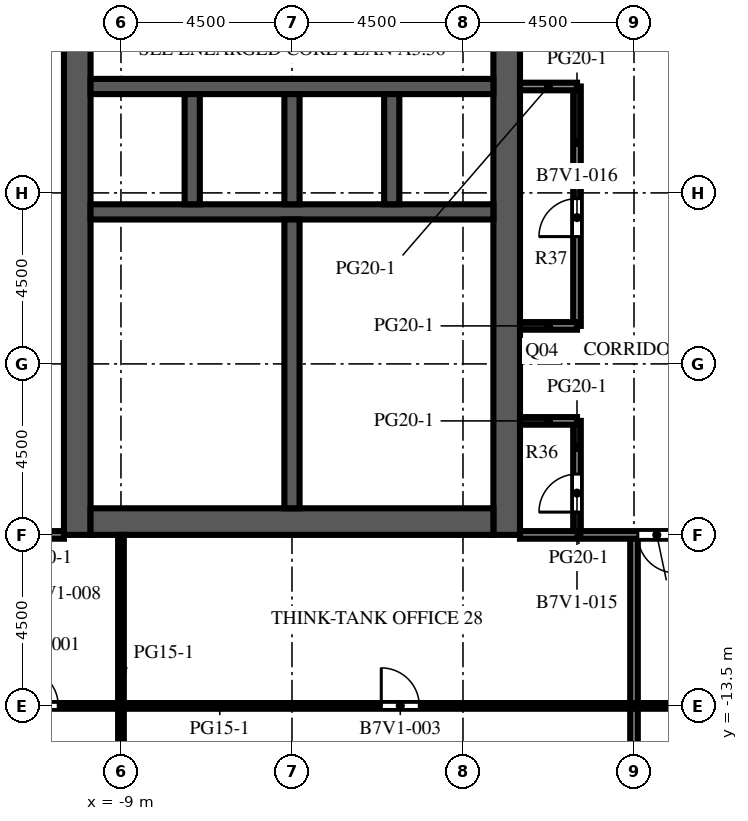
"""IFC4 building model, lengths in metres.
Left out: names, types, materials, properties, quantities, classifications, styles, units other than length and angle.
Written with IfcOpenShell. Run it as: python <this file> out.ifc"""

import sys

from ifc_helpers import new_model, si_unit, direction, frame, frame_2d, origin, place, context, subcontext, project, spatial, rectangle, extrude, element, fill, save


model = new_model("IFC4")
c1 = context("Model", 3, precision=1e-05, world=origin(), true_north=direction((0.0, 1.0)))
c2 = subcontext(c1, "Body", "Model", "MODEL_VIEW")
j1 = project(units=[si_unit("LENGTHUNIT", "METRE"), si_unit("PLANEANGLEUNIT", "RADIAN")], contexts=[c1])
p1 = place(None, origin())
s1 = spatial("IfcSite", under=j1, at=p1, CompositionType="ELEMENT")
p2 = place(p1, origin())
s2 = spatial("IfcBuilding", under=s1, at=p2, CompositionType="ELEMENT")
p3 = place(p2, frame((0.0, 0.0, 248.0)))
s3 = spatial("IfcBuildingStorey", under=s2, at=p3, CompositionType="ELEMENT", Elevation=248.0)
p4 = place(p3, frame((-10.15, -9.0, 0.0), z_axis=(0.0, 0.0, 1.0), x_axis=(0.0, 1.0, 0.0)))
e1 = element("IfcWall", 1, at=p4, inside=s3, PredefinedType="SHEAR", context=c2, shape_type="SweptSolid", body=[
    extrude(rectangle(XDim=27.5, YDim=0.7, at=frame_2d((13.75, 0.0))), origin(), (0.0, 0.0, 1.0), 4.1),
])
p5 = place(p4, frame((12.55, 0.0, 0.0)))
e2 = element("IfcOpeningElement", 2, at=p5, cuts=e1, PredefinedType="OPENING", context=c2, shape_type="SweptSolid", body=[
    extrude(rectangle(XDim=2.4, YDim=2.4, at=frame_2d((1.2, 1.2))), frame((0.0, 0.36, 0.0), z_axis=(0.0, -1.0, 0.0), x_axis=(1.0, 0.0, 0.0)), (0.0, 0.0, 1.0), 0.72),
])
p6 = place(p4, frame((6.825, 0.0, 0.0)))
e3 = element("IfcOpeningElement", 3, at=p6, cuts=e1, PredefinedType="OPENING", context=c2, shape_type="SweptSolid", body=[
    extrude(rectangle(XDim=1.2, YDim=2.1, at=frame_2d((0.6, 1.05))), frame((0.0, 0.36, 0.0), z_axis=(0.0, -1.0, 0.0), x_axis=(1.0, 0.0, 0.0)), (0.0, 0.0, 1.0), 0.72),
])
p7 = place(p4, frame((19.475, 0.0, 0.0)))
e4 = element("IfcOpeningElement", 4, at=p7, cuts=e1, PredefinedType="OPENING", context=c2, shape_type="SweptSolid", body=[
    extrude(rectangle(XDim=1.2, YDim=2.1, at=frame_2d((0.6, 1.05))), frame((0.0, 0.36, 0.0), z_axis=(0.0, -1.0, 0.0), x_axis=(1.0, 0.0, 0.0)), (0.0, 0.0, 1.0), 0.72),
])
p8 = place(p3, frame((1.15, -9.0, 0.0), z_axis=(0.0, 0.0, 1.0), x_axis=(0.0, 1.0, 0.0)))
e5 = element("IfcWall", 5, at=p8, inside=s3, PredefinedType="SHEAR", context=c2, shape_type="SweptSolid", body=[
    extrude(rectangle(XDim=27.5, YDim=0.7, at=frame_2d((13.75, 0.0))), origin(), (0.0, 0.0, 1.0), 4.1),
])
p9 = place(p8, frame((12.55, 0.0, 0.0)))
e6 = element("IfcOpeningElement", 6, at=p9, cuts=e5, PredefinedType="OPENING", context=c2, shape_type="SweptSolid", body=[
    extrude(rectangle(XDim=2.4, YDim=2.4, at=frame_2d((1.2, 1.2))), frame((0.0, 0.36, 0.0), z_axis=(0.0, -1.0, 0.0), x_axis=(1.0, 0.0, 0.0)), (0.0, 0.0, 1.0), 0.72),
])
p10 = place(p8, frame((3.9, 0.0, 0.0)))
e7 = element("IfcOpeningElement", 7, at=p10, cuts=e5, PredefinedType="OPENING", context=c2, shape_type="SweptSolid", body=[
    extrude(rectangle(XDim=1.2, YDim=2.1, at=frame_2d((0.6, 1.05))), frame((0.0, 0.36, 0.0), z_axis=(0.0, -1.0, 0.0), x_axis=(1.0, 0.0, 0.0)), (0.0, 0.0, 1.0), 0.72),
])
p11 = place(p8, frame((22.4, 0.0, 0.0)))
e8 = element("IfcOpeningElement", 8, at=p11, cuts=e5, PredefinedType="OPENING", context=c2, shape_type="SweptSolid", body=[
    extrude(rectangle(XDim=1.2, YDim=2.1, at=frame_2d((0.6, 1.05))), frame((0.0, 0.36, 0.0), z_axis=(0.0, -1.0, 0.0), x_axis=(1.0, 0.0, 0.0)), (0.0, 0.0, 1.0), 0.72),
])
p12 = place(p3, frame((-9.8, -8.65, 0.0), z_axis=(0.0, 0.0, 1.0), x_axis=(1.0, 0.0, 0.0)))
e9 = element("IfcWall", 9, at=p12, inside=s3, PredefinedType="SHEAR", context=c2, shape_type="SweptSolid", body=[
    extrude(rectangle(XDim=10.6, YDim=0.7, at=frame_2d((5.3, 0.0))), origin(), (0.0, 0.0, 1.0), 4.1),
])
p13 = place(p3, frame((-9.8, -0.5, 0.0), z_axis=(0.0, 0.0, 1.0), x_axis=(1.0, 0.0, 0.0)))
e10 = element("IfcWall", 10, at=p13, inside=s3, PredefinedType="SHEAR", context=c2, shape_type="SweptSolid", body=[
    extrude(rectangle(XDim=10.6, YDim=0.4, at=frame_2d((5.3, 0.0))), origin(), (0.0, 0.0, 1.0), 4.1),
])
p14 = place(p3, frame((-9.8, 2.8, 0.0), z_axis=(0.0, 0.0, 1.0), x_axis=(1.0, 0.0, 0.0)))
e11 = element("IfcWall", 11, at=p14, inside=s3, PredefinedType="SHEAR", context=c2, shape_type="SweptSolid", body=[
    extrude(rectangle(XDim=10.6, YDim=0.4, at=frame_2d((5.3, 0.0))), origin(), (0.0, 0.0, 1.0), 4.1),
])
p15 = place(p14, frame((0.688, 0.0, 0.0)))
e12 = element("IfcOpeningElement", 12, at=p15, cuts=e11, PredefinedType="OPENING", context=c2, shape_type="SweptSolid", body=[
    extrude(rectangle(XDim=1.1, YDim=2.1, at=frame_2d((0.55, 1.05))), frame((0.0, 0.21, 0.0), z_axis=(0.0, -1.0, 0.0), x_axis=(1.0, 0.0, 0.0)), (0.0, 0.0, 1.0), 0.42),
])
p16 = place(p14, frame((3.438, 0.0, 0.0)))
e13 = element("IfcOpeningElement", 13, at=p16, cuts=e11, PredefinedType="OPENING", context=c2, shape_type="SweptSolid", body=[
    extrude(rectangle(XDim=1.1, YDim=2.1, at=frame_2d((0.55, 1.05))), frame((0.0, 0.21, 0.0), z_axis=(0.0, -1.0, 0.0), x_axis=(1.0, 0.0, 0.0)), (0.0, 0.0, 1.0), 0.42),
])
p17 = place(p14, frame((6.113, 0.0, 0.0)))
e14 = element("IfcOpeningElement", 14, at=p17, cuts=e11, PredefinedType="OPENING", context=c2, shape_type="SweptSolid", body=[
    extrude(rectangle(XDim=1.0, YDim=2.1, at=frame_2d((0.5, 1.05))), frame((0.0, 0.21, 0.0), z_axis=(0.0, -1.0, 0.0), x_axis=(1.0, 0.0, 0.0)), (0.0, 0.0, 1.0), 0.42),
])
p18 = place(p14, frame((8.863, 0.0, 0.0)))
e15 = element("IfcOpeningElement", 15, at=p18, cuts=e11, PredefinedType="OPENING", context=c2, shape_type="SweptSolid", body=[
    extrude(rectangle(XDim=1.0, YDim=2.1, at=frame_2d((0.5, 1.05))), frame((0.0, 0.21, 0.0), z_axis=(0.0, -1.0, 0.0), x_axis=(1.0, 0.0, 0.0)), (0.0, 0.0, 1.0), 0.42),
])
for number, where, z_axis, x_axis in (
    (16, (-7.125, -0.3, 0.0), (0.0, 0.0, 1.0), (0.0, 1.0, 0.0)),
    (17, (-4.5, -0.3, 0.0), (0.0, 0.0, 1.0), (0.0, 1.0, 0.0)),
    (18, (-1.875, -0.3, 0.0), (0.0, 0.0, 1.0), (0.0, 1.0, 0.0)),
):
    element("IfcWall", number, at=place(p3, frame(where, z_axis=z_axis, x_axis=x_axis)), inside=s3, PredefinedType="SHEAR", context=c2, shape_type="SweptSolid", body=[
        extrude(rectangle(XDim=2.9, YDim=0.4, at=frame_2d((1.45, 0.0))), origin(), (0.0, 0.0, 1.0), 4.1),
    ])
p19 = place(p3, frame((-4.5, -8.3, 0.0), z_axis=(0.0, 0.0, 1.0), x_axis=(0.0, 1.0, 0.0)))
e19 = element("IfcWall", 19, at=p19, inside=s3, PredefinedType="SHEAR", context=c2, shape_type="SweptSolid", body=[
    extrude(rectangle(XDim=7.6, YDim=0.4, at=frame_2d((3.8, 0.0))), origin(), (0.0, 0.0, 1.0), 4.1),
])
p20 = place(p3, frame((-0.7, -8.3, 0.0), z_axis=(0.0, 0.0, 1.0), x_axis=(0.0, 1.0, 0.0)))
e20 = element("IfcWall", 20, at=p20, inside=s3, PredefinedType="PARTITIONING", context=c2, shape_type="SweptSolid", body=[
    extrude(rectangle(XDim=2.584, YDim=0.1, at=frame_2d((1.292, 0.0))), origin(), (0.0, 0.0, 1.0), 3.65),
])
p21 = place(p20, frame((0.792, 0.0, 0.0)))
e21 = element("IfcOpeningElement", 21, at=p21, cuts=e20, PredefinedType="OPENING", context=c2, shape_type="SweptSolid", body=[
    extrude(rectangle(XDim=1.0, YDim=2.1, at=frame_2d((0.5, 1.05))), frame((0.0, 0.06, 0.0), z_axis=(0.0, -1.0, 0.0), x_axis=(1.0, 0.0, 0.0)), (0.0, 0.0, 1.0), 0.12),
])
p22 = place(p3, frame((-0.7, -5.716, 0.0), z_axis=(0.0, 0.0, 1.0), x_axis=(0.0, 1.0, 0.0)))
e22 = element("IfcWall", 22, at=p22, inside=s3, PredefinedType="PARTITIONING", context=c2, shape_type="SweptSolid", body=[
    extrude(rectangle(XDim=2.128, YDim=0.1, at=frame_2d((1.064, 0.0))), origin(), (0.0, 0.0, 1.0), 3.65),
])
p23 = place(p22, frame((0.564, 0.0, 0.0)))
e23 = element("IfcOpeningElement", 23, at=p23, cuts=e22, PredefinedType="OPENING", context=c2, shape_type="SweptSolid", body=[
    extrude(rectangle(XDim=1.0, YDim=2.1, at=frame_2d((0.5, 1.05))), frame((0.0, 0.06, 0.0), z_axis=(0.0, -1.0, 0.0), x_axis=(1.0, 0.0, 0.0)), (0.0, 0.0, 1.0), 0.12),
])
p24 = place(p3, frame((-0.7, -3.588, 0.0), z_axis=(0.0, 0.0, 1.0), x_axis=(0.0, 1.0, 0.0)))
e24 = element("IfcWall", 24, at=p24, inside=s3, PredefinedType="PARTITIONING", context=c2, shape_type="SweptSolid", body=[
    extrude(rectangle(XDim=2.888, YDim=0.1, at=frame_2d((1.444, 0.0))), origin(), (0.0, 0.0, 1.0), 3.65),
])
p25 = place(p24, frame((0.944, 0.0, 0.0)))
e25 = element("IfcOpeningElement", 25, at=p25, cuts=e24, PredefinedType="OPENING", context=c2, shape_type="SweptSolid", body=[
    extrude(rectangle(XDim=1.0, YDim=2.1, at=frame_2d((0.5, 1.05))), frame((0.0, 0.06, 0.0), z_axis=(0.0, -1.0, 0.0), x_axis=(1.0, 0.0, 0.0)), (0.0, 0.0, 1.0), 0.12),
])
for number, where, z_axis, x_axis in (
    (26, (-4.3, -5.716, 0.0), (0.0, 0.0, 1.0), (1.0, 0.0, 0.0)),
    (27, (-4.3, -3.588, 0.0), (0.0, 0.0, 1.0), (1.0, 0.0, 0.0)),
):
    element("IfcWall", number, at=place(p3, frame(where, z_axis=z_axis, x_axis=x_axis)), inside=s3, PredefinedType="PARTITIONING", context=c2, shape_type="SweptSolid", body=[
        extrude(rectangle(XDim=3.6, YDim=0.1, at=frame_2d((1.8, 0.0))), origin(), (0.0, 0.0, 1.0), 3.65),
    ])
p26 = place(p3, frame((-9.0, -17.5, 0.0), z_axis=(0.0, 0.0, 1.0), x_axis=(0.0, 1.0, 0.0)))
e28 = element("IfcWall", 28, at=p26, inside=s3, PredefinedType="PARTITIONING", context=c2, shape_type="SweptSolid", body=[
    extrude(rectangle(XDim=8.5, YDim=0.15, at=frame_2d((4.25, 0.0))), origin(), (0.0, 0.0, 1.0), 3.65),
])
p27 = place(p3, frame((3.0, -9.0, 0.0), z_axis=(0.0, 0.0, 1.0), x_axis=(0.0, 1.0, 0.0)))
e29 = element("IfcWall", 29, at=p27, inside=s3, PredefinedType="PARTITIONING", context=c2, shape_type="SweptSolid", body=[
    extrude(rectangle(XDim=3.0, YDim=0.2, at=frame_2d((1.5, 0.0))), origin(), (0.0, 0.0, 1.0), 3.65),
])
p28 = place(p27, frame((0.6, 0.0, 0.0)))
e30 = element("IfcOpeningElement", 30, at=p28, cuts=e29, PredefinedType="OPENING", context=c2, shape_type="SweptSolid", body=[
    extrude(rectangle(XDim=1.0, YDim=2.1, at=frame_2d((0.5, 1.05))), frame((0.0, 0.11, 0.0), z_axis=(0.0, -1.0, 0.0), x_axis=(1.0, 0.0, 0.0)), (0.0, 0.0, 1.0), 0.22),
])
p29 = place(p3, frame((3.0, -3.5, 0.0), z_axis=(0.0, 0.0, 1.0), x_axis=(0.0, 1.0, 0.0)))
e31 = element("IfcWall", 31, at=p29, inside=s3, PredefinedType="PARTITIONING", context=c2, shape_type="SweptSolid", body=[
    extrude(rectangle(XDim=6.3, YDim=0.2, at=frame_2d((3.15, 0.0))), origin(), (0.0, 0.0, 1.0), 3.65),
])
p30 = place(p29, frame((2.35, 0.0, 0.0)))
e32 = element("IfcOpeningElement", 32, at=p30, cuts=e31, PredefinedType="OPENING", context=c2, shape_type="SweptSolid", body=[
    extrude(rectangle(XDim=1.0, YDim=2.1, at=frame_2d((0.5, 1.05))), frame((0.0, 0.11, 0.0), z_axis=(0.0, -1.0, 0.0), x_axis=(1.0, 0.0, 0.0)), (0.0, 0.0, 1.0), 0.22),
])
p31 = place(p3, frame((4.5, -22.1, 0.0), z_axis=(0.0, 0.0, 1.0), x_axis=(0.0, 1.0, 0.0)))
e33 = element("IfcWall", 33, at=p31, inside=s3, PredefinedType="PARTITIONING", context=c2, shape_type="SweptSolid", body=[
    extrude(rectangle(XDim=13.1, YDim=0.2, at=frame_2d((6.55, 0.0))), origin(), (0.0, 0.0, 1.0), 3.65),
])
p32 = place(p3, frame((21.0, -13.5, 0.0), z_axis=(0.0, 0.0, 1.0), x_axis=(-1.0, 0.0, 0.0)))
e34 = element("IfcWall", 34, at=p32, inside=s3, PredefinedType="PARTITIONING", context=c2, shape_type="SweptSolid", body=[
    extrude(rectangle(XDim=34.5, YDim=0.15, at=frame_2d((17.25, 0.0))), origin(), (0.0, 0.0, 1.0), 3.65),
])
p33 = place(p32, frame((31.65, 0.0, 0.0)))
e35 = element("IfcOpeningElement", 35, at=p33, cuts=e34, PredefinedType="OPENING", context=c2, shape_type="SweptSolid", body=[
    extrude(rectangle(XDim=1.0, YDim=2.1, at=frame_2d((0.5, 1.05))), frame((0.0, 0.085, 0.0), z_axis=(0.0, -1.0, 0.0), x_axis=(1.0, 0.0, 0.0)), (0.0, 0.0, 1.0), 0.17),
])
p34 = place(p32, frame((22.15, 0.0, 0.0)))
e36 = element("IfcOpeningElement", 36, at=p34, cuts=e34, PredefinedType="OPENING", context=c2, shape_type="SweptSolid", body=[
    extrude(rectangle(XDim=1.0, YDim=2.1, at=frame_2d((0.5, 1.05))), frame((0.0, 0.085, 0.0), z_axis=(0.0, -1.0, 0.0), x_axis=(1.0, 0.0, 0.0)), (0.0, 0.0, 1.0), 0.17),
])
p35 = place(p32, frame((13.15, 0.0, 0.0)))
e37 = element("IfcOpeningElement", 37, at=p35, cuts=e34, PredefinedType="OPENING", context=c2, shape_type="SweptSolid", body=[
    extrude(rectangle(XDim=1.0, YDim=2.1, at=frame_2d((0.5, 1.05))), frame((0.0, 0.085, 0.0), z_axis=(0.0, -1.0, 0.0), x_axis=(1.0, 0.0, 0.0)), (0.0, 0.0, 1.0), 0.17),
])
p36 = place(p32, frame((6.15, 0.0, 0.0)))
e38 = element("IfcOpeningElement", 38, at=p36, cuts=e34, PredefinedType="OPENING", context=c2, shape_type="SweptSolid", body=[
    extrude(rectangle(XDim=1.0, YDim=2.1, at=frame_2d((0.5, 1.05))), frame((0.0, 0.085, 0.0), z_axis=(0.0, -1.0, 0.0), x_axis=(1.0, 0.0, 0.0)), (0.0, 0.0, 1.0), 0.17),
])
p37 = place(p3, frame((-10.5, -9.0, 0.0), z_axis=(0.0, 0.0, 1.0), x_axis=(-1.0, 0.0, 0.0)))
e39 = element("IfcWall", 39, at=p37, inside=s3, PredefinedType="PARTITIONING", context=c2, shape_type="SweptSolid", body=[
    extrude(rectangle(XDim=3.0, YDim=0.2, at=frame_2d((1.5, 0.0))), origin(), (0.0, 0.0, 1.0), 3.65),
])
p38 = place(p37, frame((1.15, 0.0, 0.0)))
e40 = element("IfcOpeningElement", 40, at=p38, cuts=e39, PredefinedType="OPENING", context=c2, shape_type="SweptSolid", body=[
    extrude(rectangle(XDim=1.0, YDim=2.1, at=frame_2d((0.5, 1.05))), frame((0.0, 0.11, 0.0), z_axis=(0.0, -1.0, 0.0), x_axis=(1.0, 0.0, 0.0)), (0.0, 0.0, 1.0), 0.22),
])
p39 = place(p3, frame((6.0, -9.0, 0.0), z_axis=(0.0, 0.0, 1.0), x_axis=(-1.0, 0.0, 0.0)))
e41 = element("IfcWall", 41, at=p39, inside=s3, PredefinedType="PARTITIONING", context=c2, shape_type="SweptSolid", body=[
    extrude(rectangle(XDim=4.5, YDim=0.2, at=frame_2d((2.25, 0.0))), origin(), (0.0, 0.0, 1.0), 3.65),
])
p40 = place(p39, frame((0.4, 0.0, 0.0)))
e42 = element("IfcOpeningElement", 42, at=p40, cuts=e41, PredefinedType="OPENING", context=c2, shape_type="SweptSolid", body=[
    extrude(rectangle(XDim=1.0, YDim=2.1, at=frame_2d((0.5, 1.05))), frame((0.0, 0.11, 0.0), z_axis=(0.0, -1.0, 0.0), x_axis=(1.0, 0.0, 0.0)), (0.0, 0.0, 1.0), 0.22),
])
for number, where, z_axis, x_axis in (
    (43, (1.5, -6.0, 0.0), (0.0, 0.0, 1.0), (1.0, 0.0, 0.0)),
    (44, (1.5, -3.5, 0.0), (0.0, 0.0, 1.0), (1.0, 0.0, 0.0)),
    (45, (1.5, 2.8, 0.0), (0.0, 0.0, 1.0), (1.0, 0.0, 0.0)),
):
    element("IfcWall", number, at=place(p3, frame(where, z_axis=z_axis, x_axis=x_axis)), inside=s3, PredefinedType="PARTITIONING", context=c2, shape_type="SweptSolid", body=[
        extrude(rectangle(XDim=1.5, YDim=0.2, at=frame_2d((0.75, 0.0))), origin(), (0.0, 0.0, 1.0), 3.65),
    ])
p41 = place(p15, origin())
e46 = element("IfcDoor", 46, at=p41, inside=s3, OperationType="DOUBLE_DOOR_SLIDING", PredefinedType="DOOR", context=c2, shape_type="SweptSolid", body=[
    extrude(rectangle(XDim=1.1, YDim=2.1, at=frame_2d((0.55, 1.05))), frame((0.0, 0.025, 0.0), z_axis=(0.0, -1.0, 0.0), x_axis=(1.0, 0.0, 0.0)), (0.0, 0.0, 1.0), 0.05),
])
fill(e12, e46)
p42 = place(p16, origin())
e47 = element("IfcDoor", 47, at=p42, inside=s3, OperationType="DOUBLE_DOOR_SLIDING", PredefinedType="DOOR", context=c2, shape_type="SweptSolid", body=[
    extrude(rectangle(XDim=1.1, YDim=2.1, at=frame_2d((0.55, 1.05))), frame((0.0, 0.025, 0.0), z_axis=(0.0, -1.0, 0.0), x_axis=(1.0, 0.0, 0.0)), (0.0, 0.0, 1.0), 0.05),
])
fill(e13, e47)
p43 = place(p5, origin())
e48 = element("IfcDoor", 48, at=p43, inside=s3, OperationType="DOUBLE_DOOR_DOUBLE_SWING", PredefinedType="DOOR", context=c2, shape_type="SweptSolid", body=[
    extrude(rectangle(XDim=2.4, YDim=2.4, at=frame_2d((1.2, 1.2))), frame((0.0, 0.025, 0.0), z_axis=(0.0, -1.0, 0.0), x_axis=(1.0, 0.0, 0.0)), (0.0, 0.0, 1.0), 0.05),
])
fill(e2, e48)
p44 = place(p9, origin())
e49 = element("IfcDoor", 49, at=p44, inside=s3, OperationType="DOUBLE_DOOR_DOUBLE_SWING", PredefinedType="DOOR", context=c2, shape_type="SweptSolid", body=[
    extrude(rectangle(XDim=2.4, YDim=2.4, at=frame_2d((1.2, 1.2))), frame((0.0, 0.025, 0.0), z_axis=(0.0, -1.0, 0.0), x_axis=(1.0, 0.0, 0.0)), (0.0, 0.0, 1.0), 0.05),
])
fill(e6, e49)
p45 = place(p6, origin())
e50 = element("IfcDoor", 50, at=p45, inside=s3, OperationType="SINGLE_SWING_LEFT", PredefinedType="DOOR", context=c2, shape_type="SweptSolid", body=[
    extrude(rectangle(XDim=1.2, YDim=2.1, at=frame_2d((0.6, 1.05))), frame((0.0, 0.025, 0.0), z_axis=(0.0, -1.0, 0.0), x_axis=(1.0, 0.0, 0.0)), (0.0, 0.0, 1.0), 0.05),
])
fill(e3, e50)
p46 = place(p17, origin())
e51 = element("IfcDoor", 51, at=p46, inside=s3, OperationType="SINGLE_SWING_LEFT", PredefinedType="DOOR", context=c2, shape_type="SweptSolid", body=[
    extrude(rectangle(XDim=1.0, YDim=2.1, at=frame_2d((0.5, 1.05))), frame((0.0, 0.025, 0.0), z_axis=(0.0, -1.0, 0.0), x_axis=(1.0, 0.0, 0.0)), (0.0, 0.0, 1.0), 0.05),
])
fill(e14, e51)
p47 = place(p18, origin())
e52 = element("IfcDoor", 52, at=p47, inside=s3, OperationType="SINGLE_SWING_RIGHT", PredefinedType="DOOR", context=c2, shape_type="SweptSolid", body=[
    extrude(rectangle(XDim=1.0, YDim=2.1, at=frame_2d((0.5, 1.05))), frame((0.0, 0.025, 0.0), z_axis=(0.0, -1.0, 0.0), x_axis=(1.0, 0.0, 0.0)), (0.0, 0.0, 1.0), 0.05),
])
fill(e15, e52)
p48 = place(p10, origin())
e53 = element("IfcDoor", 53, at=p48, inside=s3, OperationType="SINGLE_SWING_LEFT", PredefinedType="DOOR", context=c2, shape_type="SweptSolid", body=[
    extrude(rectangle(XDim=1.2, YDim=2.1, at=frame_2d((0.6, 1.05))), frame((0.0, 0.325, 0.0), z_axis=(0.0, -1.0, 0.0), x_axis=(1.0, 0.0, 0.0)), (0.0, 0.0, 1.0), 0.05),
])
fill(e7, e53)
p49 = place(p21, origin())
e54 = element("IfcDoor", 54, at=p49, inside=s3, OperationType="SINGLE_SWING_RIGHT", PredefinedType="DOOR", context=c2, shape_type="SweptSolid", body=[
    extrude(rectangle(XDim=1.0, YDim=2.1, at=frame_2d((0.5, 1.05))), frame((0.0, 0.025, 0.0), z_axis=(0.0, -1.0, 0.0), x_axis=(1.0, 0.0, 0.0)), (0.0, 0.0, 1.0), 0.05),
])
fill(e21, e54)
p50 = place(p23, origin())
e55 = element("IfcDoor", 55, at=p50, inside=s3, OperationType="SINGLE_SWING_LEFT", PredefinedType="DOOR", context=c2, shape_type="SweptSolid", body=[
    extrude(rectangle(XDim=1.0, YDim=2.1, at=frame_2d((0.5, 1.05))), frame((0.0, 0.025, 0.0), z_axis=(0.0, -1.0, 0.0), x_axis=(1.0, 0.0, 0.0)), (0.0, 0.0, 1.0), 0.05),
])
fill(e23, e55)
p51 = place(p25, origin())
e56 = element("IfcDoor", 56, at=p51, inside=s3, OperationType="SINGLE_SWING_RIGHT", PredefinedType="DOOR", context=c2, shape_type="SweptSolid", body=[
    extrude(rectangle(XDim=1.0, YDim=2.1, at=frame_2d((0.5, 1.05))), frame((0.0, 0.025, 0.0), z_axis=(0.0, -1.0, 0.0), x_axis=(1.0, 0.0, 0.0)), (0.0, 0.0, 1.0), 0.05),
])
fill(e25, e56)
p52 = place(p33, origin())
e57 = element("IfcDoor", 57, at=p52, inside=s3, OperationType="SINGLE_SWING_RIGHT", PredefinedType="DOOR", context=c2, shape_type="SweptSolid", body=[
    extrude(rectangle(XDim=1.0, YDim=2.1, at=frame_2d((0.5, 1.05))), frame((0.0, 0.025, 0.0), z_axis=(0.0, -1.0, 0.0), x_axis=(1.0, 0.0, 0.0)), (0.0, 0.0, 1.0), 0.05),
])
fill(e35, e57)
p53 = place(p34, origin())
e58 = element("IfcDoor", 58, at=p53, inside=s3, OperationType="SINGLE_SWING_RIGHT", PredefinedType="DOOR", context=c2, shape_type="SweptSolid", body=[
    extrude(rectangle(XDim=1.0, YDim=2.1, at=frame_2d((0.5, 1.05))), frame((0.0, 0.025, 0.0), z_axis=(0.0, -1.0, 0.0), x_axis=(1.0, 0.0, 0.0)), (0.0, 0.0, 1.0), 0.05),
])
fill(e36, e58)
p54 = place(p40, origin())
e59 = element("IfcDoor", 59, at=p54, inside=s3, OperationType="SINGLE_SWING_LEFT", PredefinedType="DOOR", context=c2, shape_type="SweptSolid", body=[
    extrude(rectangle(XDim=1.0, YDim=2.1, at=frame_2d((0.5, 1.05))), frame((0.0, 0.025, 0.0), z_axis=(0.0, -1.0, 0.0), x_axis=(1.0, 0.0, 0.0)), (0.0, 0.0, 1.0), 0.05),
])
fill(e42, e59)
p55 = place(p28, origin())
e60 = element("IfcDoor", 60, at=p55, inside=s3, OperationType="SINGLE_SWING_LEFT", PredefinedType="DOOR", context=c2, shape_type="SweptSolid", body=[
    extrude(rectangle(XDim=1.0, YDim=2.1, at=frame_2d((0.5, 1.05))), frame((0.0, 0.025, 0.0), z_axis=(0.0, -1.0, 0.0), x_axis=(1.0, 0.0, 0.0)), (0.0, 0.0, 1.0), 0.05),
])
fill(e30, e60)
p56 = place(p30, origin())
e61 = element("IfcDoor", 61, at=p56, inside=s3, OperationType="SINGLE_SWING_LEFT", PredefinedType="DOOR", context=c2, shape_type="SweptSolid", body=[
    extrude(rectangle(XDim=1.0, YDim=2.1, at=frame_2d((0.5, 1.05))), frame((0.0, 0.025, 0.0), z_axis=(0.0, -1.0, 0.0), x_axis=(1.0, 0.0, 0.0)), (0.0, 0.0, 1.0), 0.05),
])
fill(e32, e61)
save(model, sys.argv[1])
